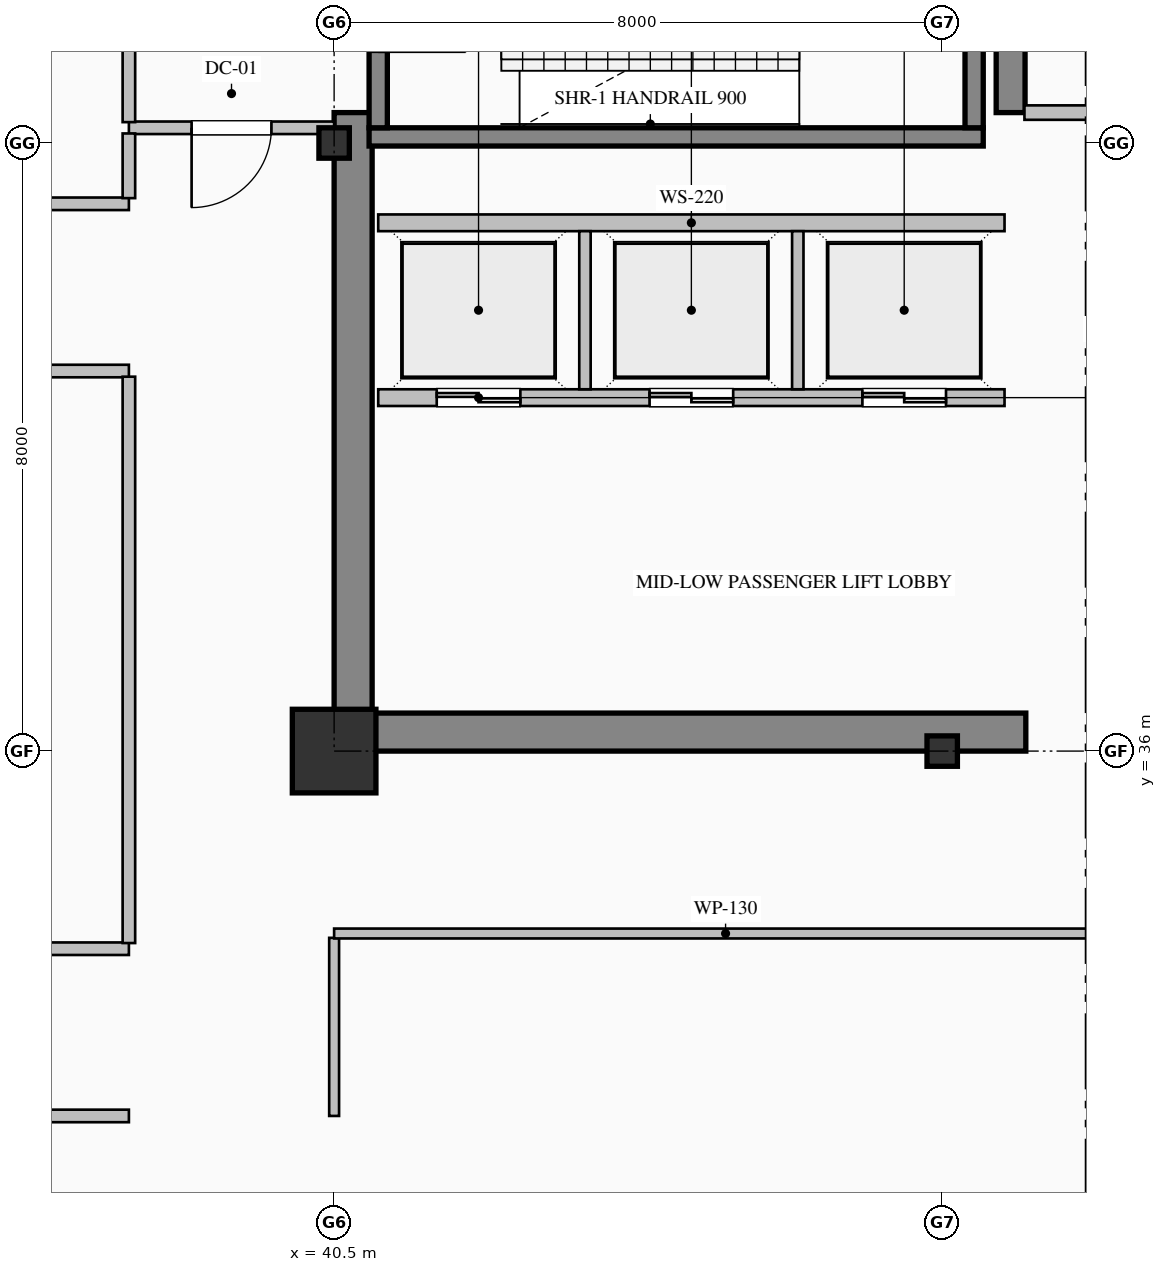
"""IFC4 building model, lengths in metres.
Left out: names, types, materials, properties, quantities, classifications, styles, units other than length and angle.
Written with IfcOpenShell. Run it as: python <this file> out.ifc"""

import sys

from ifc_helpers import new_model, si_unit, direction, frame, frame_2d, origin, origin_2d, place, context, subcontext, project, spatial, rectangle, hollow_rectangle, i_section, extrude, element, fill, save


model = new_model("IFC4")
c1 = context("Model", 3, precision=1e-05, world=origin(), true_north=direction((0.0, 1.0)))
c2 = subcontext(c1, "Body", "Model", "MODEL_VIEW")
j1 = project(units=[si_unit("LENGTHUNIT", "METRE"), si_unit("PLANEANGLEUNIT", "RADIAN")], contexts=[c1])
p1 = place(None, origin())
s1 = spatial("IfcSite", under=j1, at=p1, CompositionType="ELEMENT")
p2 = place(p1, origin())
s2 = spatial("IfcBuilding", under=s1, at=p2, CompositionType="ELEMENT")
p3 = place(p2, frame((0.0, 0.0, 113.6)))
s3 = spatial("IfcBuildingStorey", under=s2, at=p3, CompositionType="ELEMENT", Elevation=113.6)
p4 = place(p3, frame((40.75, 36.5, 0.0), z_axis=(0.0, 0.0, 1.0), x_axis=(0.0, 1.0, 0.0)))
e1 = element("IfcWall", 1, at=p4, inside=s3, PredefinedType="SHEAR", context=c2, shape_type="SweptSolid", body=[
    extrude(rectangle(XDim=7.9, YDim=0.5, at=frame_2d((3.95, 0.0))), origin(), (0.0, 0.0, 1.0), 5.165),
])
p5 = place(p3, frame((40.5, 36.25, 0.0), z_axis=(0.0, 0.0, 1.0), x_axis=(1.0, 0.0, 0.0)))
e2 = element("IfcWall", 2, at=p5, inside=s3, PredefinedType="SHEAR", context=c2, shape_type="SweptSolid", body=[
    extrude(rectangle(XDim=9.1, YDim=0.5, at=frame_2d((4.55, 0.0))), origin(), (0.0, 0.0, 1.0), 5.165),
])
p6 = place(p3, frame((49.4, 44.4, 0.0), z_axis=(0.0, 0.0, 1.0), x_axis=(0.0, 1.0, 0.0)))
e3 = element("IfcWall", 3, at=p6, inside=s3, PredefinedType="SHEAR", context=c2, shape_type="SweptSolid", body=[
    extrude(rectangle(XDim=3.0, YDim=0.38, at=frame_2d((1.5, 0.0))), origin(), (0.0, 0.0, 1.0), 5.165),
])
p7 = place(p3, frame((40.5, 36.0, 0.0), z_axis=(0.0, 0.0, 1.0), x_axis=(1.0, 0.0, 0.0)))
e4 = element("IfcColumn", 4, at=p7, inside=s3, PredefinedType="COLUMN", context=c2, shape_type="SweptSolid", body=[
    extrude(hollow_rectangle(XDim=1.1, YDim=1.1, WallThickness=0.04, at=origin_2d()), origin(), (0.0, 0.0, 1.0), 5.4),
])
for number, where, z_axis, x_axis in (
    (5, (40.5, 44.0, 0.0), (0.0, 0.0, 1.0), (1.0, 0.0, 0.0)),
    (6, (48.5, 36.0, 0.0), (0.0, 0.0, 1.0), (1.0, 0.0, 0.0)),
):
    element("IfcColumn", number, at=place(p3, frame(where, z_axis=z_axis, x_axis=x_axis)), inside=s3, PredefinedType="COLUMN", context=c2, shape_type="SweptSolid", body=[
        extrude(i_section(OverallWidth=0.4, OverallDepth=0.4, WebThickness=0.013, FlangeThickness=0.021, FilletRadius=0.022, at=origin_2d()), origin(), (0.0, 0.0, 1.0), 5.4),
    ])
p8 = place(p3, frame((49.04, 44.08, 0.0), z_axis=(0.0, 0.0, 1.0), x_axis=(-1.0, 0.0, 0.0)))
e7 = element("IfcWall", 7, at=p8, inside=s3, PredefinedType="SOLIDWALL", context=c2, shape_type="SweptSolid", body=[
    extrude(rectangle(XDim=8.08, YDim=0.24, at=frame_2d((4.04, 0.0))), origin(), (0.0, 0.0, 1.0), 5.4),
])
p9 = place(p3, frame((41.08, 47.35, 0.0), z_axis=(0.0, 0.0, 1.0), x_axis=(0.0, -1.0, 0.0)))
e8 = element("IfcWall", 8, at=p9, inside=s3, PredefinedType="SOLIDWALL", context=c2, shape_type="SweptSolid", body=[
    extrude(rectangle(XDim=3.15, YDim=0.24, at=frame_2d((1.575, 0.0))), origin(), (0.0, 0.0, 1.0), 5.4),
])
p10 = place(p9, frame((1.0, 0.0, 0.0)))
e9 = element("IfcOpeningElement", 9, at=p10, cuts=e8, PredefinedType="OPENING", context=c2, shape_type="SweptSolid", body=[
    extrude(rectangle(XDim=1.15, YDim=2.2, at=frame_2d((0.575, 1.1))), frame((0.0, 0.13, 0.0), z_axis=(0.0, -1.0, 0.0), x_axis=(1.0, 0.0, 0.0)), (0.0, 0.0, 1.0), 0.26),
])
p11 = place(p3, frame((48.92, 44.2, 0.0), z_axis=(0.0, 0.0, 1.0), x_axis=(0.0, 1.0, 0.0)))
e10 = element("IfcWall", 10, at=p11, inside=s3, PredefinedType="SOLIDWALL", context=c2, shape_type="SweptSolid", body=[
    extrude(rectangle(XDim=3.15, YDim=0.24, at=frame_2d((1.575, 0.0))), origin(), (0.0, 0.0, 1.0), 5.4),
])
p12 = place(p3, frame((49.32, 40.65, 0.0), z_axis=(0.0, 0.0, 1.0), x_axis=(-1.0, 0.0, 0.0)))
e11 = element("IfcWall", 11, at=p12, inside=s3, PredefinedType="PARTITIONING", context=c2, shape_type="SweptSolid", body=[
    extrude(rectangle(XDim=8.24, YDim=0.22, at=frame_2d((4.12, 0.0))), origin(), (0.0, 0.0, 1.0), 5.165),
])
p13 = place(p12, frame((6.37, 0.0, 0.0)))
e12 = element("IfcOpeningElement", 12, at=p13, cuts=e11, PredefinedType="OPENING", context=c2, shape_type="SweptSolid", body=[
    extrude(rectangle(XDim=1.1, YDim=2.2, at=frame_2d((0.55, 1.1))), frame((0.0, 0.12, 0.0), z_axis=(0.0, -1.0, 0.0), x_axis=(1.0, 0.0, 0.0)), (0.0, 0.0, 1.0), 0.24),
])
p14 = place(p12, frame((3.57, 0.0, 0.0)))
e13 = element("IfcOpeningElement", 13, at=p14, cuts=e11, PredefinedType="OPENING", context=c2, shape_type="SweptSolid", body=[
    extrude(rectangle(XDim=1.1, YDim=2.2, at=frame_2d((0.55, 1.1))), frame((0.0, 0.12, 0.0), z_axis=(0.0, -1.0, 0.0), x_axis=(1.0, 0.0, 0.0)), (0.0, 0.0, 1.0), 0.24),
])
p15 = place(p12, frame((0.77, 0.0, 0.0)))
e14 = element("IfcOpeningElement", 14, at=p15, cuts=e11, PredefinedType="OPENING", context=c2, shape_type="SweptSolid", body=[
    extrude(rectangle(XDim=1.1, YDim=2.2, at=frame_2d((0.55, 1.1))), frame((0.0, 0.12, 0.0), z_axis=(0.0, -1.0, 0.0), x_axis=(1.0, 0.0, 0.0)), (0.0, 0.0, 1.0), 0.24),
])
p16 = place(p3, frame((41.08, 42.95, 0.0), z_axis=(0.0, 0.0, 1.0), x_axis=(1.0, 0.0, 0.0)))
e15 = element("IfcWall", 15, at=p16, inside=s3, PredefinedType="PARTITIONING", context=c2, shape_type="SweptSolid", body=[
    extrude(rectangle(XDim=8.24, YDim=0.22, at=frame_2d((4.12, 0.0))), origin(), (0.0, 0.0, 1.0), 5.165),
])
for number, where, z_axis, x_axis in (
    (16, (43.8, 40.76, 0.0), (0.0, 0.0, 1.0), (0.0, 1.0, 0.0)),
    (17, (46.6, 40.76, 0.0), (0.0, 0.0, 1.0), (0.0, 1.0, 0.0)),
):
    element("IfcWall", number, at=place(p3, frame(where, z_axis=z_axis, x_axis=x_axis)), inside=s3, PredefinedType="PARTITIONING", context=c2, shape_type="SweptSolid", body=[
        extrude(rectangle(XDim=2.08, YDim=0.15, at=frame_2d((1.04, 0.0))), origin(), (0.0, 0.0, 1.0), 5.165),
    ])
p17 = place(p3, frame((40.5, 44.2, 0.0), z_axis=(0.0, 0.0, 1.0), x_axis=(-1.0, 0.0, 0.0)))
e18 = element("IfcWall", 18, at=p17, inside=s3, PredefinedType="PARTITIONING", context=c2, shape_type="SweptSolid", body=[
    extrude(rectangle(XDim=2.7, YDim=0.165, at=frame_2d((1.35, 0.0))), origin(), (0.0, 0.0, 1.0), 5.165),
])
p18 = place(p17, frame((0.825, 0.0, 0.0)))
e19 = element("IfcOpeningElement", 19, at=p18, cuts=e18, PredefinedType="OPENING", context=c2, shape_type="SweptSolid", body=[
    extrude(rectangle(XDim=1.05, YDim=2.15, at=frame_2d((0.525, 1.075))), frame((0.0, 0.093, 0.0), z_axis=(0.0, -1.0, 0.0), x_axis=(1.0, 0.0, 0.0)), (0.0, 0.0, 1.0), 0.185),
])
p19 = place(p3, frame((37.8, 44.274, 0.0), z_axis=(0.0, 0.0, 1.0), x_axis=(0.0, 1.0, 0.0)))
e20 = element("IfcWall", 20, at=p19, inside=s3, PredefinedType="PARTITIONING", context=c2, shape_type="SweptSolid", body=[
    extrude(rectangle(XDim=3.051, YDim=0.165, at=frame_2d((1.525, 0.0))), origin(), (0.0, 0.0, 1.0), 5.165),
])
p20 = place(p3, frame((54.718, 44.4, 0.0), z_axis=(0.0, 0.0, 1.0), x_axis=(-1.0, 0.0, 0.0)))
e21 = element("IfcWall", 21, at=p20, inside=s3, PredefinedType="PARTITIONING", context=c2, shape_type="SweptSolid", body=[
    extrude(rectangle(XDim=5.136, YDim=0.19, at=frame_2d((2.568, 0.0))), origin(), (0.0, 0.0, 1.0), 5.165),
])
p21 = place(p20, frame((2.043, 0.0, 0.0)))
e22 = element("IfcOpeningElement", 22, at=p21, cuts=e21, PredefinedType="OPENING", context=c2, shape_type="SweptSolid", body=[
    extrude(rectangle(XDim=1.05, YDim=2.15, at=frame_2d((0.525, 1.075))), frame((0.0, 0.105, 0.0), z_axis=(0.0, -1.0, 0.0), x_axis=(1.0, 0.0, 0.0)), (0.0, 0.0, 1.0), 0.21),
])
p22 = place(p3, frame((28.2, 33.4, 0.0), z_axis=(0.0, 0.0, 1.0), x_axis=(1.0, 0.0, 0.0)))
e23 = element("IfcWall", 23, at=p22, inside=s3, PredefinedType="PARTITIONING", context=c2, shape_type="SweptSolid", body=[
    extrude(rectangle(XDim=9.6, YDim=0.165, at=frame_2d((4.8, 0.0))), origin(), (0.0, 0.0, 1.0), 5.165),
])
p23 = place(p22, frame((4.3, 0.0, 0.0)))
e24 = element("IfcOpeningElement", 24, at=p23, cuts=e23, PredefinedType="OPENING", context=c2, shape_type="SweptSolid", body=[
    extrude(rectangle(XDim=1.0, YDim=2.15, at=frame_2d((0.5, 1.075))), frame((0.0, 0.093, 0.0), z_axis=(0.0, -1.0, 0.0), x_axis=(1.0, 0.0, 0.0)), (0.0, 0.0, 1.0), 0.185),
])
p24 = place(p3, frame((37.8, 31.2, 0.0), z_axis=(0.0, 0.0, 1.0), x_axis=(-1.0, 0.0, 0.0)))
e25 = element("IfcWall", 25, at=p24, inside=s3, PredefinedType="PARTITIONING", context=c2, shape_type="SweptSolid", body=[
    extrude(rectangle(XDim=13.3, YDim=0.165, at=frame_2d((6.65, 0.0))), origin(), (0.0, 0.0, 1.0), 5.165),
])
p25 = place(p24, frame((6.15, 0.0, 0.0)))
e26 = element("IfcOpeningElement", 26, at=p25, cuts=e25, PredefinedType="OPENING", context=c2, shape_type="SweptSolid", body=[
    extrude(rectangle(XDim=1.0, YDim=2.15, at=frame_2d((0.5, 1.075))), frame((0.0, 0.093, 0.0), z_axis=(0.0, -1.0, 0.0), x_axis=(1.0, 0.0, 0.0)), (0.0, 0.0, 1.0), 0.185),
])
p26 = place(p3, frame((16.5, 43.2, 0.0), z_axis=(0.0, 0.0, 1.0), x_axis=(1.0, 0.0, 0.0)))
e27 = element("IfcWall", 27, at=p26, inside=s3, PredefinedType="PARTITIONING", context=c2, shape_type="SweptSolid", body=[
    extrude(rectangle(XDim=21.3, YDim=0.165, at=frame_2d((10.65, 0.0))), origin(), (0.0, 0.0, 1.0), 5.165),
])
p27 = place(p26, frame((10.15, 0.0, 0.0)))
e28 = element("IfcOpeningElement", 28, at=p27, cuts=e27, PredefinedType="OPENING", context=c2, shape_type="SweptSolid", body=[
    extrude(rectangle(XDim=1.0, YDim=2.15, at=frame_2d((0.5, 1.075))), frame((0.0, 0.093, 0.0), z_axis=(0.0, -1.0, 0.0), x_axis=(1.0, 0.0, 0.0)), (0.0, 0.0, 1.0), 0.185),
])
p28 = place(p3, frame((37.8, 41.0, 0.0), z_axis=(0.0, 0.0, 1.0), x_axis=(-1.0, 0.0, 0.0)))
e29 = element("IfcWall", 29, at=p28, inside=s3, PredefinedType="PARTITIONING", context=c2, shape_type="SweptSolid", body=[
    extrude(rectangle(XDim=9.6, YDim=0.165, at=frame_2d((4.8, 0.0))), origin(), (0.0, 0.0, 1.0), 5.165),
])
p29 = place(p3, frame((37.8, 43.274, 0.0), z_axis=(0.0, 0.0, 1.0), x_axis=(0.0, 1.0, 0.0)))
e30 = element("IfcWall", 30, at=p29, inside=s3, PredefinedType="PARTITIONING", context=c2, shape_type="SweptSolid", body=[
    extrude(rectangle(XDim=0.851, YDim=0.165, at=frame_2d((0.426, 0.0))), origin(), (0.0, 0.0, 1.0), 5.165),
])
p30 = place(p3, frame((37.8, 33.475, 0.0), z_axis=(0.0, 0.0, 1.0), x_axis=(0.0, 1.0, 0.0)))
e31 = element("IfcWall", 31, at=p30, inside=s3, PredefinedType="PARTITIONING", context=c2, shape_type="SweptSolid", body=[
    extrude(rectangle(XDim=7.451, YDim=0.165, at=frame_2d((3.726, 0.0))), origin(), (0.0, 0.0, 1.0), 5.165),
])
p31 = place(p3, frame((40.5, 33.543, 0.0), z_axis=(0.0, 0.0, 1.0), x_axis=(0.0, -1.0, 0.0)))
e32 = element("IfcWall", 32, at=p31, inside=s3, PredefinedType="PARTITIONING", context=c2, shape_type="SweptSolid", body=[
    extrude(rectangle(XDim=2.343, YDim=0.13, at=frame_2d((1.171, 0.0))), origin(), (0.0, 0.0, 1.0), 4.557),
])
p32 = place(p3, frame((50.8, 33.6, 0.0), z_axis=(0.0, 0.0, 1.0), x_axis=(-1.0, 0.0, 0.0)))
e33 = element("IfcWall", 33, at=p32, inside=s3, PredefinedType="PARTITIONING", context=c2, shape_type="SweptSolid", body=[
    extrude(rectangle(XDim=10.3, YDim=0.13, at=frame_2d((5.15, 0.0))), origin(), (0.0, 0.0, 1.0), 5.165),
])
p33 = place(p13, origin())
e34 = element("IfcDoor", 34, at=p33, inside=s3, OperationType="DOUBLE_DOOR_SLIDING", PredefinedType="DOOR", context=c2, shape_type="SweptSolid", body=[
    extrude(rectangle(XDim=1.1, YDim=2.2, at=frame_2d((0.55, 1.1))), frame((0.0, 0.025, 0.0), z_axis=(0.0, -1.0, 0.0), x_axis=(1.0, 0.0, 0.0)), (0.0, 0.0, 1.0), 0.05),
])
fill(e12, e34)
p34 = place(p14, origin())
e35 = element("IfcDoor", 35, at=p34, inside=s3, OperationType="DOUBLE_DOOR_SLIDING", PredefinedType="DOOR", context=c2, shape_type="SweptSolid", body=[
    extrude(rectangle(XDim=1.1, YDim=2.2, at=frame_2d((0.55, 1.1))), frame((0.0, 0.025, 0.0), z_axis=(0.0, -1.0, 0.0), x_axis=(1.0, 0.0, 0.0)), (0.0, 0.0, 1.0), 0.05),
])
fill(e13, e35)
p35 = place(p15, origin())
e36 = element("IfcDoor", 36, at=p35, inside=s3, OperationType="DOUBLE_DOOR_SLIDING", PredefinedType="DOOR", context=c2, shape_type="SweptSolid", body=[
    extrude(rectangle(XDim=1.1, YDim=2.2, at=frame_2d((0.55, 1.1))), frame((0.0, 0.025, 0.0), z_axis=(0.0, -1.0, 0.0), x_axis=(1.0, 0.0, 0.0)), (0.0, 0.0, 1.0), 0.05),
])
fill(e14, e36)
p36 = place(p18, origin())
e37 = element("IfcDoor", 37, at=p36, inside=s3, OperationType="SINGLE_SWING_RIGHT", PredefinedType="DOOR", context=c2, shape_type="SweptSolid", body=[
    extrude(rectangle(XDim=1.05, YDim=2.15, at=frame_2d((0.525, 1.075))), frame((0.0, 0.025, 0.0), z_axis=(0.0, -1.0, 0.0), x_axis=(1.0, 0.0, 0.0)), (0.0, 0.0, 1.0), 0.05),
])
fill(e19, e37)
save(model, sys.argv[1])
